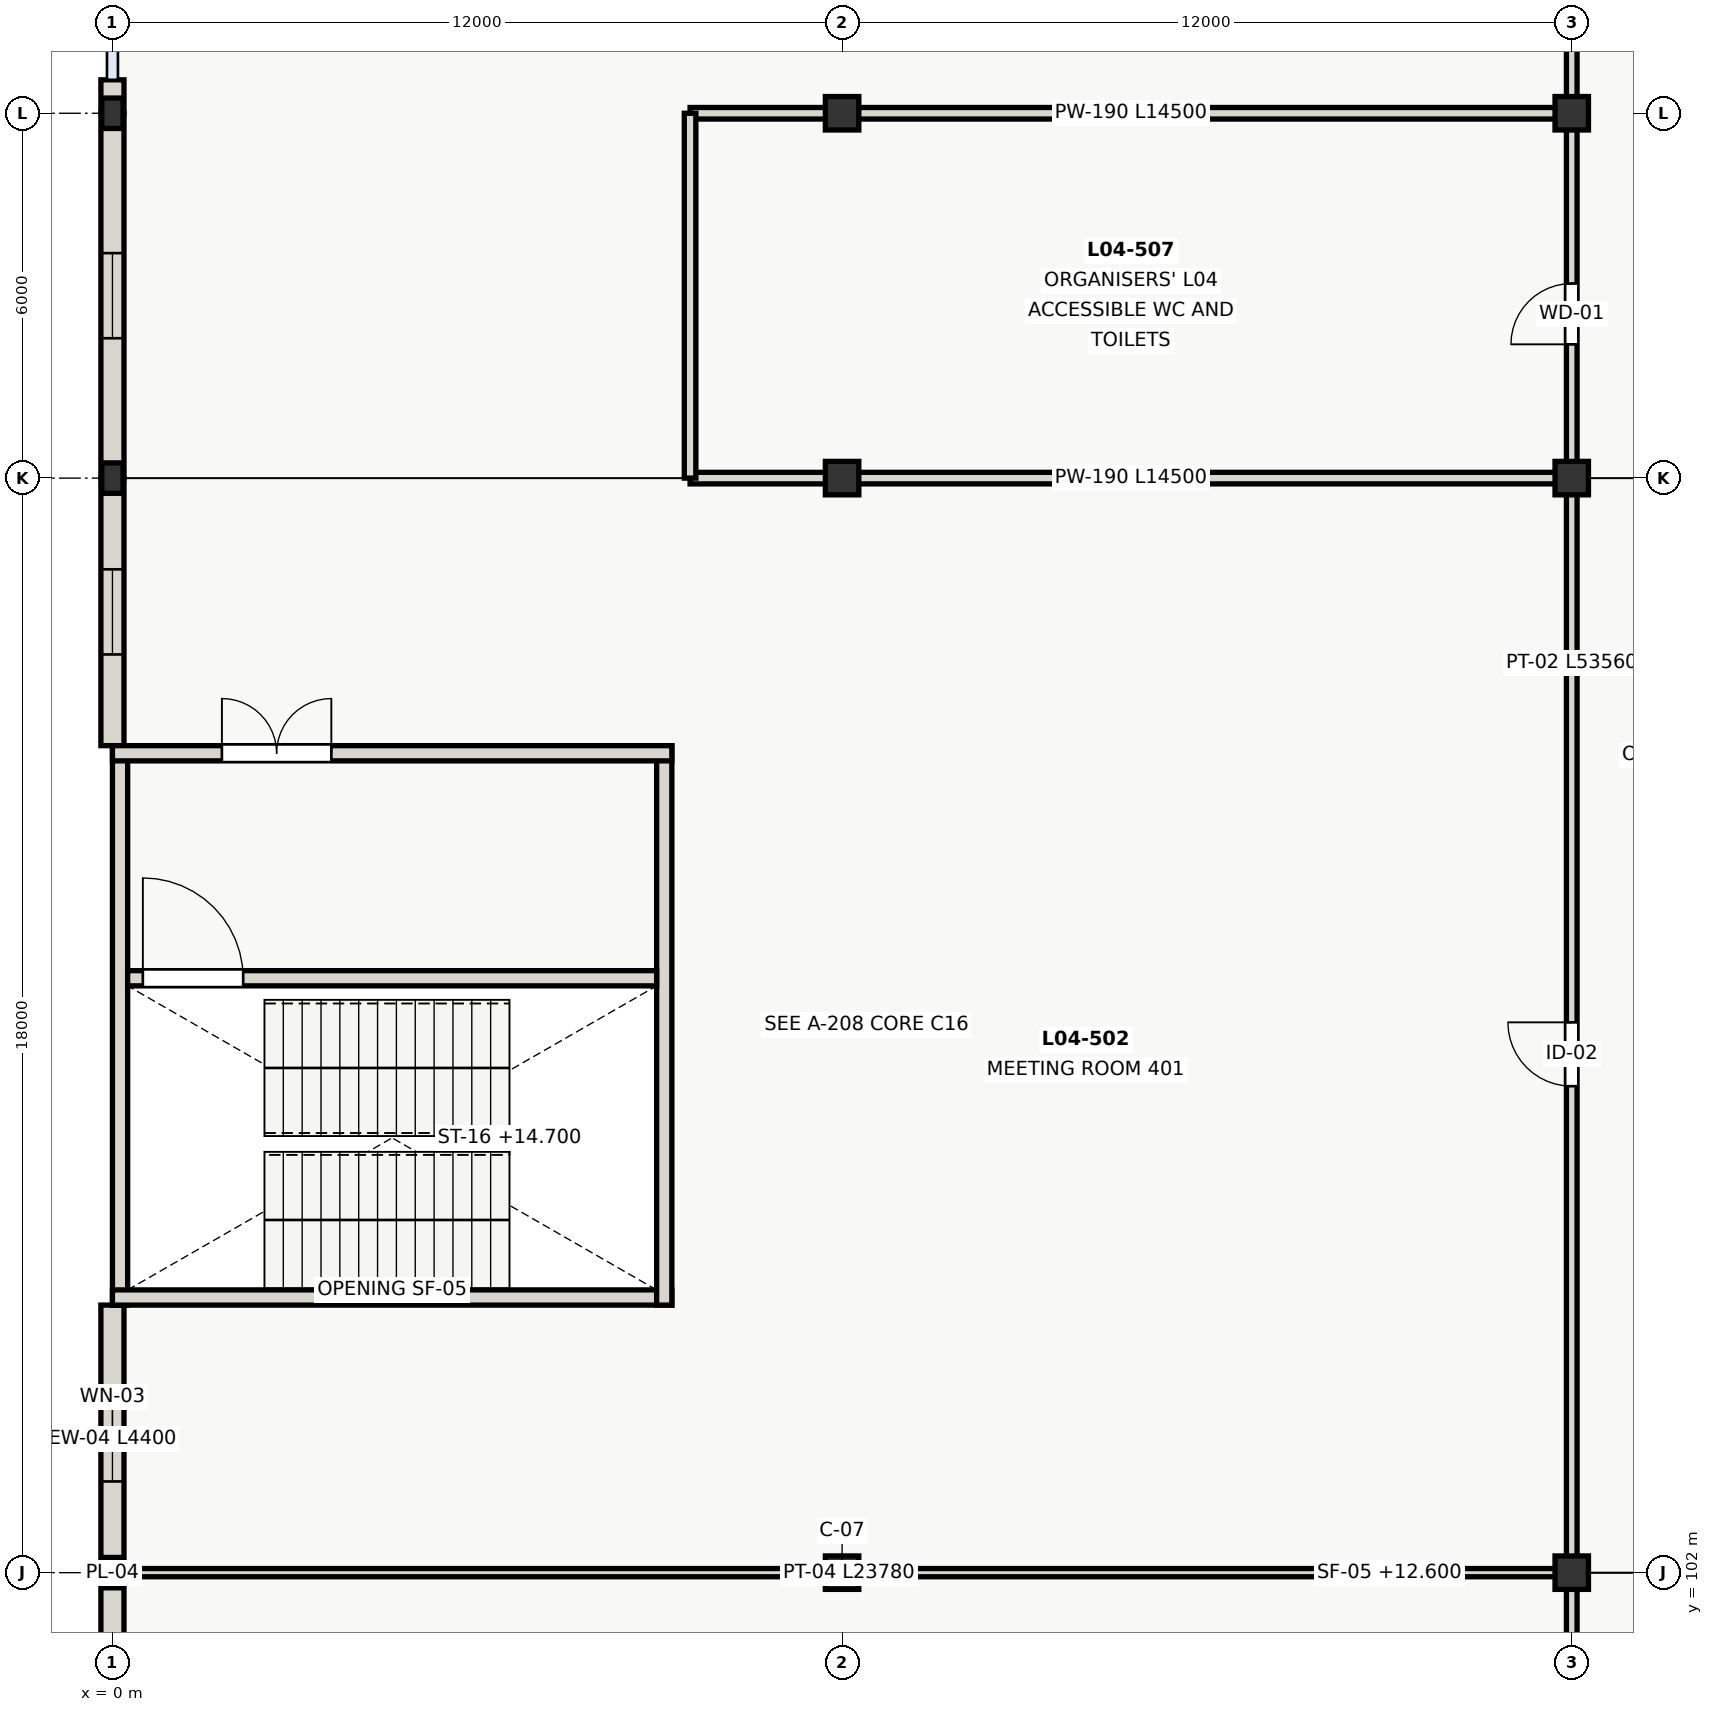
"""IFC4 building model, lengths in metres.
Left out: names, types, materials, properties, quantities, classifications, styles, units other than length and angle.
Written with IfcOpenShell. Run it as: python <this file> out.ifc"""

import sys

from ifc_helpers import new_model, si_unit, direction, frame, frame_2d, origin, origin_2d, place, context, subcontext, project, spatial, rectangle, extrude, element, fill, save


model = new_model("IFC4")
c1 = context("Model", 3, precision=1e-05, world=origin(), true_north=direction((0.0, 1.0)))
c2 = subcontext(c1, "Body", "Model", "MODEL_VIEW")
j1 = project(units=[si_unit("LENGTHUNIT", "METRE"), si_unit("PLANEANGLEUNIT", "RADIAN")], contexts=[c1])
p1 = place(None, origin())
s1 = spatial("IfcSite", under=j1, at=p1, CompositionType="ELEMENT")
p2 = place(p1, origin())
s2 = spatial("IfcBuilding", under=s1, at=p2, CompositionType="ELEMENT")
p3 = place(p2, frame((0.0, 0.0, 12.6)))
s3 = spatial("IfcBuildingStorey", under=s2, at=p3, CompositionType="ELEMENT", Elevation=12.6)
p4 = place(p3, frame((0.0, 102.0, 0.0), z_axis=(0.0, 0.0, 1.0), x_axis=(1.0, 0.0, 0.0)))
e1 = element("IfcColumn", 1, at=p4, inside=s3, PredefinedType="PILASTER", context=c2, shape_type="SweptSolid", body=[
    extrude(rectangle(XDim=0.35, YDim=0.5, at=origin_2d()), origin(), (0.0, 0.0, 1.0), 4.2),
])
for number, where, z_axis, x_axis in (
    (2, (12.0, 102.0, 0.0), (0.0, 0.0, 1.0), (1.0, 0.0, 0.0)),
    (3, (24.0, 102.0, 0.0), (0.0, 0.0, 1.0), (1.0, 0.0, 0.0)),
):
    element("IfcColumn", number, at=place(p3, frame(where, z_axis=z_axis, x_axis=x_axis)), inside=s3, PredefinedType="COLUMN", context=c2, shape_type="SweptSolid", body=[
        extrude(rectangle(XDim=0.55, YDim=0.55, at=origin_2d()), origin(), (0.0, 0.0, 1.0), 4.2),
    ])
p5 = place(p3, frame((0.0, 120.0, 0.0), z_axis=(0.0, 0.0, 1.0), x_axis=(1.0, 0.0, 0.0)))
e4 = element("IfcColumn", 4, at=p5, inside=s3, PredefinedType="PILASTER", context=c2, shape_type="SweptSolid", body=[
    extrude(rectangle(XDim=0.35, YDim=0.5, at=origin_2d()), origin(), (0.0, 0.0, 1.0), 4.2),
])
for number, where, z_axis, x_axis in (
    (5, (12.0, 120.0, 0.0), (0.0, 0.0, 1.0), (1.0, 0.0, 0.0)),
    (6, (24.0, 120.0, 0.0), (0.0, 0.0, 1.0), (1.0, 0.0, 0.0)),
):
    element("IfcColumn", number, at=place(p3, frame(where, z_axis=z_axis, x_axis=x_axis)), inside=s3, PredefinedType="COLUMN", context=c2, shape_type="SweptSolid", body=[
        extrude(rectangle(XDim=0.55, YDim=0.55, at=origin_2d()), origin(), (0.0, 0.0, 1.0), 4.2),
    ])
p6 = place(p3, frame((0.0, 126.0, 0.0), z_axis=(0.0, 0.0, 1.0), x_axis=(1.0, 0.0, 0.0)))
e7 = element("IfcColumn", 7, at=p6, inside=s3, PredefinedType="PILASTER", context=c2, shape_type="SweptSolid", body=[
    extrude(rectangle(XDim=0.35, YDim=0.5, at=origin_2d()), origin(), (0.0, 0.0, 1.0), 4.2),
])
for number, where, z_axis, x_axis in (
    (8, (12.0, 126.0, 0.0), (0.0, 0.0, 1.0), (1.0, 0.0, 0.0)),
    (9, (24.0, 126.0, 0.0), (0.0, 0.0, 1.0), (1.0, 0.0, 0.0)),
):
    element("IfcColumn", number, at=place(p3, frame(where, z_axis=z_axis, x_axis=x_axis)), inside=s3, PredefinedType="COLUMN", context=c2, shape_type="SweptSolid", body=[
        extrude(rectangle(XDim=0.55, YDim=0.55, at=origin_2d()), origin(), (0.0, 0.0, 1.0), 4.2),
    ])
p7 = place(p3, frame((0.0, 97.6, 0.0), z_axis=(0.0, 0.0, 1.0), x_axis=(0.0, 1.0, 0.0)))
e10 = element("IfcWall", 10, at=p7, inside=s3, PredefinedType="SOLIDWALL", context=c2, shape_type="SweptSolid", body=[
    extrude(rectangle(XDim=4.4, YDim=0.38, at=frame_2d((2.2, 0.0))), origin(), (0.0, 0.0, 1.0), 3.38),
])
p8 = place(p7, frame((1.5, 0.0, 0.9)))
e11 = element("IfcOpeningElement", 11, at=p8, cuts=e10, PredefinedType="OPENING", context=c2, shape_type="SweptSolid", body=[
    extrude(rectangle(XDim=1.4, YDim=1.95, at=frame_2d((0.7, 0.975))), frame((0.0, 0.2, 0.0), z_axis=(0.0, -1.0, 0.0), x_axis=(1.0, 0.0, 0.0)), (0.0, 0.0, 1.0), 0.4),
])
p9 = place(p3, frame((0.0, 102.0, 0.0), z_axis=(0.0, 0.0, 1.0), x_axis=(0.0, 1.0, 0.0)))
e12 = element("IfcWall", 12, at=p9, inside=s3, PredefinedType="SOLIDWALL", context=c2, shape_type="SweptSolid", body=[
    extrude(rectangle(XDim=4.4, YDim=0.38, at=frame_2d((2.2, 0.0))), origin(), (0.0, 0.0, 1.0), 3.38),
])
p10 = place(p9, frame((1.5, 0.0, 0.9)))
e13 = element("IfcOpeningElement", 13, at=p10, cuts=e12, PredefinedType="OPENING", context=c2, shape_type="SweptSolid", body=[
    extrude(rectangle(XDim=1.4, YDim=1.95, at=frame_2d((0.7, 0.975))), frame((0.0, 0.2, 0.0), z_axis=(0.0, -1.0, 0.0), x_axis=(1.0, 0.0, 0.0)), (0.0, 0.0, 1.0), 0.4),
])
p11 = place(p3, frame((0.0, 115.6, 0.0), z_axis=(0.0, 0.0, 1.0), x_axis=(0.0, 1.0, 0.0)))
e14 = element("IfcWall", 14, at=p11, inside=s3, PredefinedType="SOLIDWALL", context=c2, shape_type="SweptSolid", body=[
    extrude(rectangle(XDim=4.4, YDim=0.38, at=frame_2d((2.2, 0.0))), origin(), (0.0, 0.0, 1.0), 3.38),
])
p12 = place(p11, frame((1.5, 0.0, 0.9)))
e15 = element("IfcOpeningElement", 15, at=p12, cuts=e14, PredefinedType="OPENING", context=c2, shape_type="SweptSolid", body=[
    extrude(rectangle(XDim=1.4, YDim=1.95, at=frame_2d((0.7, 0.975))), frame((0.0, 0.2, 0.0), z_axis=(0.0, -1.0, 0.0), x_axis=(1.0, 0.0, 0.0)), (0.0, 0.0, 1.0), 0.4),
])
p13 = place(p3, frame((0.0, 120.0, 0.0), z_axis=(0.0, 0.0, 1.0), x_axis=(0.0, 1.0, 0.0)))
e16 = element("IfcWall", 16, at=p13, inside=s3, PredefinedType="SOLIDWALL", context=c2, shape_type="SweptSolid", body=[
    extrude(rectangle(XDim=6.0, YDim=0.38, at=frame_2d((3.0, 0.0))), origin(), (0.0, 0.0, 1.0), 3.59),
])
p14 = place(p13, frame((2.3, 0.0, 0.9)))
e17 = element("IfcOpeningElement", 17, at=p14, cuts=e16, PredefinedType="OPENING", context=c2, shape_type="SweptSolid", body=[
    extrude(rectangle(XDim=1.4, YDim=1.95, at=frame_2d((0.7, 0.975))), frame((0.0, 0.2, 0.0), z_axis=(0.0, -1.0, 0.0), x_axis=(1.0, 0.0, 0.0)), (0.0, 0.0, 1.0), 0.4),
])
p15 = place(p3, frame((0.0, 126.002, 0.0), z_axis=(0.0, 0.0, 1.0), x_axis=(0.0, 1.0, 0.0)))
e18 = element("IfcWall", 18, at=p15, inside=s3, PredefinedType="SOLIDWALL", context=c2, shape_type="SweptSolid", body=[
    extrude(rectangle(XDim=0.548, YDim=0.38, at=frame_2d((0.274, 0.0))), origin(), (0.0, 0.0, 1.0), 3.5),
])
p16 = place(p3, frame((0.125, 106.4, 0.0), z_axis=(0.0, 0.0, 1.0), x_axis=(0.0, 1.0, 0.0)))
e19 = element("IfcWall", 19, at=p16, inside=s3, PredefinedType="SHEAR", context=c2, shape_type="SweptSolid", body=[
    extrude(rectangle(XDim=9.2, YDim=0.25, at=frame_2d((4.6, 0.0))), origin(), (0.0, 0.0, 1.0), 4.2),
])
p17 = place(p3, frame((0.0, 106.525, 0.0), z_axis=(0.0, 0.0, 1.0), x_axis=(1.0, 0.0, 0.0)))
e20 = element("IfcWall", 20, at=p17, inside=s3, PredefinedType="SHEAR", context=c2, shape_type="SweptSolid", body=[
    extrude(rectangle(XDim=9.2, YDim=0.25, at=frame_2d((4.6, 0.0))), origin(), (0.0, 0.0, 1.0), 4.2),
])
p18 = place(p3, frame((9.075, 106.4, 0.0), z_axis=(0.0, 0.0, 1.0), x_axis=(0.0, 1.0, 0.0)))
e21 = element("IfcWall", 21, at=p18, inside=s3, PredefinedType="SHEAR", context=c2, shape_type="SweptSolid", body=[
    extrude(rectangle(XDim=9.2, YDim=0.25, at=frame_2d((4.6, 0.0))), origin(), (0.0, 0.0, 1.0), 4.2),
])
p19 = place(p3, frame((0.0, 115.475, 0.0), z_axis=(0.0, 0.0, 1.0), x_axis=(1.0, 0.0, 0.0)))
e22 = element("IfcWall", 22, at=p19, inside=s3, PredefinedType="SHEAR", context=c2, shape_type="SweptSolid", body=[
    extrude(rectangle(XDim=9.2, YDim=0.25, at=frame_2d((4.6, 0.0))), origin(), (0.0, 0.0, 1.0), 4.2),
])
p20 = place(p19, frame((1.8, 0.0, 0.0)))
e23 = element("IfcOpeningElement", 23, at=p20, cuts=e22, PredefinedType="OPENING", context=c2, shape_type="SweptSolid", body=[
    extrude(rectangle(XDim=1.8, YDim=2.15, at=frame_2d((0.9, 1.075))), frame((0.0, 0.135, 0.0), z_axis=(0.0, -1.0, 0.0), x_axis=(1.0, 0.0, 0.0)), (0.0, 0.0, 1.0), 0.27),
])
p21 = place(p3, frame((0.25, 111.775, 0.0), z_axis=(0.0, 0.0, 1.0), x_axis=(1.0, 0.0, 0.0)))
e24 = element("IfcWall", 24, at=p21, inside=s3, PredefinedType="SHEAR", context=c2, shape_type="SweptSolid", body=[
    extrude(rectangle(XDim=8.7, YDim=0.25, at=frame_2d((4.35, 0.0))), origin(), (0.0, 0.0, 1.0), 4.2),
])
p22 = place(p21, frame((0.25, 0.0, 0.0)))
e25 = element("IfcOpeningElement", 25, at=p22, cuts=e24, PredefinedType="OPENING", context=c2, shape_type="SweptSolid", body=[
    extrude(rectangle(XDim=1.65, YDim=2.1, at=frame_2d((0.825, 1.05))), frame((0.0, 0.135, 0.0), z_axis=(0.0, -1.0, 0.0), x_axis=(1.0, 0.0, 0.0)), (0.0, 0.0, 1.0), 0.27),
])
p23 = place(p3, frame((24.0, 84.22, 0.0), z_axis=(0.0, 0.0, 1.0), x_axis=(0.0, 1.0, 0.0)))
e26 = element("IfcWall", 26, at=p23, inside=s3, PredefinedType="PARTITIONING", context=c2, shape_type="SweptSolid", body=[
    extrude(rectangle(XDim=53.56, YDim=0.175, at=frame_2d((26.78, 0.0))), origin(), (0.0, 0.0, 1.0), 3.28),
])
p24 = place(p23, frame((1.98, 0.0, 0.0)))
e27 = element("IfcOpeningElement", 27, at=p24, cuts=e26, PredefinedType="OPENING", context=c2, shape_type="SweptSolid", body=[
    extrude(rectangle(XDim=1.05, YDim=2.1, at=frame_2d((0.525, 1.05))), frame((0.0, 0.097, 0.0), z_axis=(0.0, -1.0, 0.0), x_axis=(1.0, 0.0, 0.0)), (0.0, 0.0, 1.0), 0.195),
])
p25 = place(p23, frame((10.28, 0.0, 0.0)))
e28 = element("IfcOpeningElement", 28, at=p25, cuts=e26, PredefinedType="OPENING", context=c2, shape_type="SweptSolid", body=[
    extrude(rectangle(XDim=1.8, YDim=2.15, at=frame_2d((0.9, 1.075))), frame((0.0, 0.097, 0.0), z_axis=(0.0, -1.0, 0.0), x_axis=(1.0, 0.0, 0.0)), (0.0, 0.0, 1.0), 0.195),
])
p26 = place(p23, frame((14.58, 0.0, 0.0)))
e29 = element("IfcOpeningElement", 29, at=p26, cuts=e26, PredefinedType="OPENING", context=c2, shape_type="SweptSolid", body=[
    extrude(rectangle(XDim=1.05, YDim=2.1, at=frame_2d((0.525, 1.05))), frame((0.0, 0.097, 0.0), z_axis=(0.0, -1.0, 0.0), x_axis=(1.0, 0.0, 0.0)), (0.0, 0.0, 1.0), 0.195),
])
p27 = place(p23, frame((25.78, 0.0, 0.0)))
e30 = element("IfcOpeningElement", 30, at=p27, cuts=e26, PredefinedType="OPENING", context=c2, shape_type="SweptSolid", body=[
    extrude(rectangle(XDim=1.05, YDim=2.1, at=frame_2d((0.525, 1.05))), frame((0.0, 0.097, 0.0), z_axis=(0.0, -1.0, 0.0), x_axis=(1.0, 0.0, 0.0)), (0.0, 0.0, 1.0), 0.195),
])
p28 = place(p23, frame((37.98, 0.0, 0.0)))
e31 = element("IfcOpeningElement", 31, at=p28, cuts=e26, PredefinedType="OPENING", context=c2, shape_type="SweptSolid", body=[
    extrude(rectangle(XDim=1.0, YDim=2.1, at=frame_2d((0.5, 1.05))), frame((0.0, 0.097, 0.0), z_axis=(0.0, -1.0, 0.0), x_axis=(1.0, 0.0, 0.0)), (0.0, 0.0, 1.0), 0.195),
])
p29 = place(p23, frame((47.28, 0.0, 0.0)))
e32 = element("IfcOpeningElement", 32, at=p29, cuts=e26, PredefinedType="OPENING", context=c2, shape_type="SweptSolid", body=[
    extrude(rectangle(XDim=0.98, YDim=2.1, at=frame_2d((0.49, 1.05))), frame((0.0, 0.097, 0.0), z_axis=(0.0, -1.0, 0.0), x_axis=(1.0, 0.0, 0.0)), (0.0, 0.0, 1.0), 0.195),
])
p30 = place(p3, frame((0.22, 102.0, 0.0), z_axis=(0.0, 0.0, 1.0), x_axis=(1.0, 0.0, 0.0)))
e33 = element("IfcWall", 33, at=p30, inside=s3, PredefinedType="PARTITIONING", context=c2, shape_type="SweptSolid", body=[
    extrude(rectangle(XDim=23.78, YDim=0.135, at=frame_2d((11.89, 0.0))), origin(), (0.0, 0.0, 1.0), 3.44),
])
for number, where, z_axis, x_axis in (
    (34, (9.5, 120.0, 0.0), (0.0, 0.0, 1.0), (1.0, 0.0, 0.0)),
    (35, (9.5, 126.0, 0.0), (0.0, 0.0, 1.0), (1.0, 0.0, 0.0)),
):
    element("IfcWall", number, at=place(p3, frame(where, z_axis=z_axis, x_axis=x_axis)), inside=s3, PredefinedType="PLUMBINGWALL", context=c2, shape_type="SweptSolid", body=[
        extrude(rectangle(XDim=14.5, YDim=0.19, at=frame_2d((7.25, 0.0))), origin(), (0.0, 0.0, 1.0), 3.44),
    ])
p31 = place(p3, frame((9.5, 120.0, 0.0), z_axis=(0.0, 0.0, 1.0), x_axis=(0.0, 1.0, 0.0)))
e36 = element("IfcWall", 36, at=p31, inside=s3, PredefinedType="PLUMBINGWALL", context=c2, shape_type="SweptSolid", body=[
    extrude(rectangle(XDim=6.0, YDim=0.19, at=frame_2d((3.0, 0.0))), origin(), (0.0, 0.0, 1.0), 3.78),
])
p32 = place(p10, origin())
e37 = element("IfcWindow", 37, at=p32, inside=s3, PartitioningType="SINGLE_PANEL", PredefinedType="WINDOW", context=c2, shape_type="SweptSolid", body=[
    extrude(rectangle(XDim=1.4, YDim=1.95, at=frame_2d((0.7, 0.975))), frame((0.0, 0.03, 0.0), z_axis=(0.0, -1.0, 0.0), x_axis=(1.0, 0.0, 0.0)), (0.0, 0.0, 1.0), 0.06),
])
fill(e13, e37)
p33 = place(p12, origin())
e38 = element("IfcWindow", 38, at=p33, inside=s3, PartitioningType="SINGLE_PANEL", PredefinedType="WINDOW", context=c2, shape_type="SweptSolid", body=[
    extrude(rectangle(XDim=1.4, YDim=1.95, at=frame_2d((0.7, 0.975))), frame((0.0, 0.03, 0.0), z_axis=(0.0, -1.0, 0.0), x_axis=(1.0, 0.0, 0.0)), (0.0, 0.0, 1.0), 0.06),
])
fill(e15, e38)
p34 = place(p14, origin())
e39 = element("IfcWindow", 39, at=p34, inside=s3, PartitioningType="SINGLE_PANEL", PredefinedType="WINDOW", context=c2, shape_type="SweptSolid", body=[
    extrude(rectangle(XDim=1.4, YDim=1.95, at=frame_2d((0.7, 0.975))), frame((0.0, 0.03, 0.0), z_axis=(0.0, -1.0, 0.0), x_axis=(1.0, 0.0, 0.0)), (0.0, 0.0, 1.0), 0.06),
])
fill(e17, e39)
p35 = place(p20, origin())
e40 = element("IfcDoor", 40, at=p35, inside=s3, OperationType="DOUBLE_DOOR_SINGLE_SWING", PredefinedType="DOOR", context=c2, shape_type="SweptSolid", body=[
    extrude(rectangle(XDim=1.8, YDim=2.15, at=frame_2d((0.9, 1.075))), frame((0.0, 0.025, 0.0), z_axis=(0.0, -1.0, 0.0), x_axis=(1.0, 0.0, 0.0)), (0.0, 0.0, 1.0), 0.05),
])
fill(e23, e40)
p36 = place(p22, origin())
e41 = element("IfcDoor", 41, at=p36, inside=s3, OperationType="SINGLE_SWING_LEFT", PredefinedType="DOOR", context=c2, shape_type="SweptSolid", body=[
    extrude(rectangle(XDim=1.65, YDim=2.1, at=frame_2d((0.825, 1.05))), frame((0.0, 0.025, 0.0), z_axis=(0.0, -1.0, 0.0), x_axis=(1.0, 0.0, 0.0)), (0.0, 0.0, 1.0), 0.05),
])
fill(e25, e41)
p37 = place(p27, origin())
e42 = element("IfcDoor", 42, at=p37, inside=s3, OperationType="SINGLE_SWING_RIGHT", PredefinedType="DOOR", context=c2, shape_type="SweptSolid", body=[
    extrude(rectangle(XDim=1.05, YDim=2.1, at=frame_2d((0.525, 1.05))), frame((0.0, 0.025, 0.0), z_axis=(0.0, -1.0, 0.0), x_axis=(1.0, 0.0, 0.0)), (0.0, 0.0, 1.0), 0.05),
])
fill(e30, e42)
p38 = place(p28, origin())
e43 = element("IfcDoor", 43, at=p38, inside=s3, OperationType="SINGLE_SWING_LEFT", PredefinedType="DOOR", context=c2, shape_type="SweptSolid", body=[
    extrude(rectangle(XDim=1.0, YDim=2.1, at=frame_2d((0.5, 1.05))), frame((0.0, 0.025, 0.0), z_axis=(0.0, -1.0, 0.0), x_axis=(1.0, 0.0, 0.0)), (0.0, 0.0, 1.0), 0.05),
])
fill(e31, e43)
save(model, sys.argv[1])
